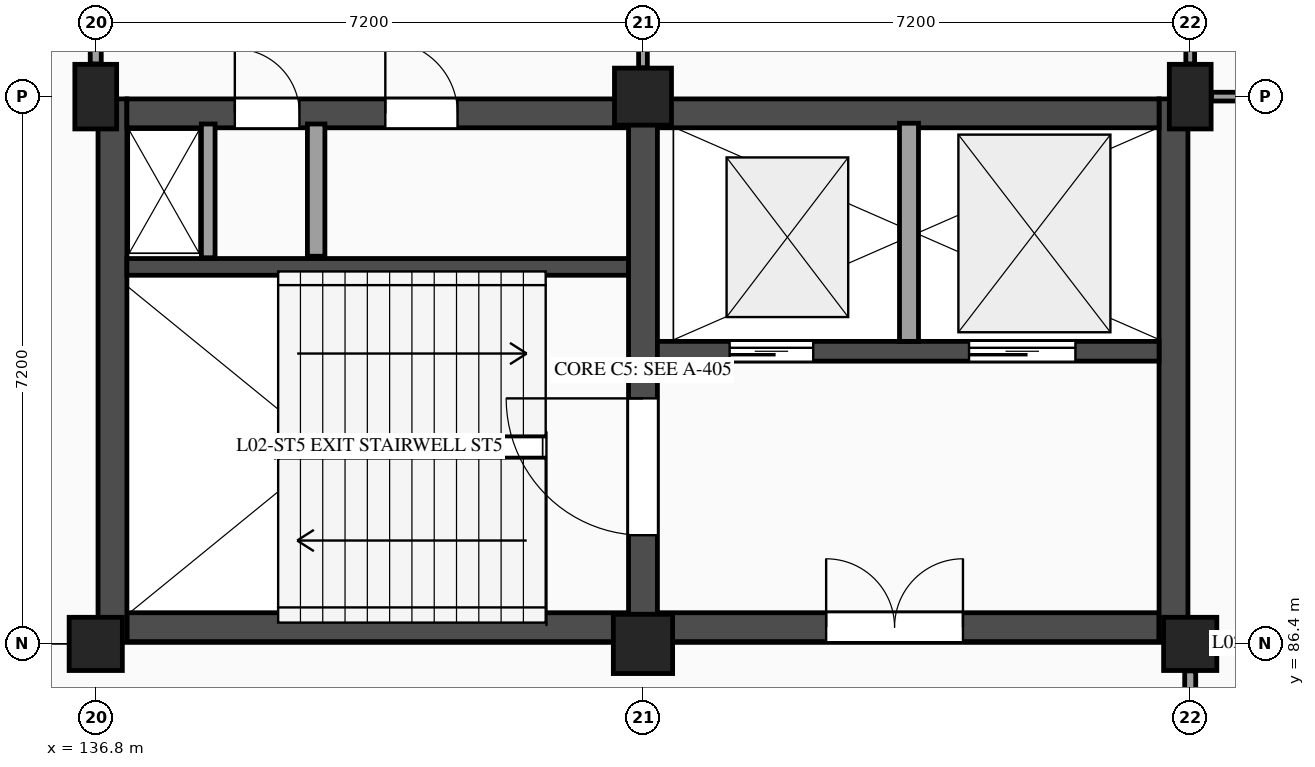
"""IFC4 building model, lengths in metres.
Left out: names, types, materials, properties, quantities, classifications, styles, units other than length and angle.
Written with IfcOpenShell. Run it as: python <this file> out.ifc"""

import sys

from ifc_helpers import new_model, si_unit, direction, frame, frame_2d, origin, origin_2d, place, context, subcontext, project, spatial, rectangle, extrude, element, fill, save


model = new_model("IFC4")
c1 = context("Model", 3, precision=1e-05, world=origin(), true_north=direction((0.0, 1.0)))
c2 = subcontext(c1, "Body", "Model", "MODEL_VIEW")
j1 = project(units=[si_unit("LENGTHUNIT", "METRE"), si_unit("PLANEANGLEUNIT", "RADIAN")], contexts=[c1])
p1 = place(None, origin())
s1 = spatial("IfcSite", under=j1, at=p1, CompositionType="ELEMENT")
p2 = place(p1, origin())
s2 = spatial("IfcBuilding", under=s1, at=p2, CompositionType="ELEMENT")
p3 = place(p2, frame((0.0, 0.0, 9.9)))
s3 = spatial("IfcBuildingStorey", under=s2, at=p3, CompositionType="ELEMENT", Elevation=9.9)
p4 = place(p3, frame((136.8, 86.4, 0.0), z_axis=(0.0, 0.0, 1.0), x_axis=(1.0, 0.0, 0.0)))
e1 = element("IfcColumn", 1, at=p4, inside=s3, PredefinedType="COLUMN", context=c2, shape_type="SweptSolid", body=[
    extrude(rectangle(XDim=0.7, YDim=0.7, at=origin_2d()), origin(), (0.0, 0.0, 1.0), 4.5),
])
p5 = place(p3, frame((136.8, 93.6, 0.0), z_axis=(0.0, 0.0, 1.0), x_axis=(1.0, 0.0, 0.0)))
e2 = element("IfcColumn", 2, at=p5, inside=s3, PredefinedType="COLUMN", context=c2, shape_type="SweptSolid", body=[
    extrude(rectangle(XDim=0.55, YDim=0.85, at=origin_2d()), origin(), (0.0, 0.0, 1.0), 4.5),
])
p6 = place(p3, frame((144.0, 86.4, 0.0), z_axis=(0.0, 0.0, 1.0), x_axis=(1.0, 0.0, 0.0)))
e3 = element("IfcColumn", 3, at=p6, inside=s3, PredefinedType="COLUMN", context=c2, shape_type="SweptSolid", body=[
    extrude(rectangle(XDim=0.78, YDim=0.78, at=origin_2d()), origin(), (0.0, 0.0, 1.0), 4.5),
])
p7 = place(p3, frame((144.0, 93.6, 0.0), z_axis=(0.0, 0.0, 1.0), x_axis=(1.0, 0.0, 0.0)))
e4 = element("IfcColumn", 4, at=p7, inside=s3, PredefinedType="COLUMN", context=c2, shape_type="SweptSolid", body=[
    extrude(rectangle(XDim=0.75, YDim=0.75, at=origin_2d()), origin(), (0.0, 0.0, 1.0), 4.5),
])
p8 = place(p3, frame((151.2, 86.4, 0.0), z_axis=(0.0, 0.0, 1.0), x_axis=(1.0, 0.0, 0.0)))
e5 = element("IfcColumn", 5, at=p8, inside=s3, PredefinedType="COLUMN", context=c2, shape_type="SweptSolid", body=[
    extrude(rectangle(XDim=0.7, YDim=0.7, at=origin_2d()), origin(), (0.0, 0.0, 1.0), 4.5),
])
p9 = place(p3, frame((151.2, 93.6, 0.0), z_axis=(0.0, 0.0, 1.0), x_axis=(1.0, 0.0, 0.0)))
e6 = element("IfcColumn", 6, at=p9, inside=s3, PredefinedType="COLUMN", context=c2, shape_type="SweptSolid", body=[
    extrude(rectangle(XDim=0.55, YDim=0.85, at=origin_2d()), origin(), (0.0, 0.0, 1.0), 4.5),
])
p10 = place(p3, frame((137.21, 86.62, 0.0), z_axis=(0.0, 0.0, 1.0), x_axis=(1.0, 0.0, 0.0)))
e7 = element("IfcWall", 7, at=p10, inside=s3, PredefinedType="SHEAR", context=c2, shape_type="SweptSolid", body=[
    extrude(rectangle(XDim=6.6, YDim=0.38, at=frame_2d((3.3, 0.0))), origin(), (0.0, 0.0, 1.0), 4.225),
])
p11 = place(p3, frame((137.02, 93.57, 0.0), z_axis=(0.0, 0.0, 1.0), x_axis=(0.0, -1.0, 0.0)))
e8 = element("IfcWall", 8, at=p11, inside=s3, PredefinedType="SHEAR", context=c2, shape_type="SweptSolid", body=[
    extrude(rectangle(XDim=7.14, YDim=0.38, at=frame_2d((3.57, 0.0))), origin(), (0.0, 0.0, 1.0), 4.225),
])
p12 = place(p3, frame((137.21, 93.38, 0.0), z_axis=(0.0, 0.0, 1.0), x_axis=(1.0, 0.0, 0.0)))
e9 = element("IfcWall", 9, at=p12, inside=s3, PredefinedType="SHEAR", context=c2, shape_type="SweptSolid", body=[
    extrude(rectangle(XDim=6.6, YDim=0.38, at=frame_2d((3.3, 0.0))), origin(), (0.0, 0.0, 1.0), 4.225),
])
p13 = place(p12, frame((1.42, 0.0, 0.0)))
e10 = element("IfcOpeningElement", 10, at=p13, cuts=e9, PredefinedType="OPENING", context=c2, shape_type="SweptSolid", body=[
    extrude(rectangle(XDim=0.85, YDim=2.1, at=frame_2d((0.425, 1.05))), frame((0.0, 0.2, 0.0), z_axis=(0.0, -1.0, 0.0), x_axis=(1.0, 0.0, 0.0)), (0.0, 0.0, 1.0), 0.4),
])
p14 = place(p12, frame((3.4, 0.0, 0.0)))
e11 = element("IfcOpeningElement", 11, at=p14, cuts=e9, PredefinedType="OPENING", context=c2, shape_type="SweptSolid", body=[
    extrude(rectangle(XDim=0.95, YDim=2.15, at=frame_2d((0.475, 1.075))), frame((0.0, 0.2, 0.0), z_axis=(0.0, -1.0, 0.0), x_axis=(1.0, 0.0, 0.0)), (0.0, 0.0, 1.0), 0.4),
])
p15 = place(p3, frame((137.21, 91.36, 0.0), z_axis=(0.0, 0.0, 1.0), x_axis=(1.0, 0.0, 0.0)))
e12 = element("IfcWall", 12, at=p15, inside=s3, PredefinedType="SHEAR", context=c2, shape_type="SweptSolid", body=[
    extrude(rectangle(XDim=6.6, YDim=0.22, at=frame_2d((3.3, 0.0))), origin(), (0.0, 0.0, 1.0), 4.225),
])
p16 = place(p3, frame((139.7, 91.5, 0.0), z_axis=(0.0, 0.0, 1.0), x_axis=(0.0, 1.0, 0.0)))
e13 = element("IfcWall", 13, at=p16, inside=s3, PredefinedType="PARTITIONING", context=c2, shape_type="SweptSolid", body=[
    extrude(rectangle(XDim=1.74, YDim=0.23, at=frame_2d((0.87, 0.0))), origin(), (0.0, 0.0, 1.0), 4.225),
])
p17 = place(p3, frame((138.28, 91.48, 0.0), z_axis=(0.0, 0.0, 1.0), x_axis=(0.0, 1.0, 0.0)))
e14 = element("IfcWall", 14, at=p17, inside=s3, PredefinedType="PARTITIONING", context=c2, shape_type="SweptSolid", body=[
    extrude(rectangle(XDim=1.76, YDim=0.18, at=frame_2d((0.88, 0.0))), origin(), (0.0, 0.0, 1.0), 4.225),
])
p18 = place(p3, frame((144.0, 86.43, 0.0), z_axis=(0.0, 0.0, 1.0), x_axis=(0.0, 1.0, 0.0)))
e15 = element("IfcWall", 15, at=p18, inside=s3, PredefinedType="SHEAR", context=c2, shape_type="SweptSolid", body=[
    extrude(rectangle(XDim=7.14, YDim=0.38, at=frame_2d((3.57, 0.0))), origin(), (0.0, 0.0, 1.0), 4.225),
])
p19 = place(p18, frame((1.4, 0.0, 0.0)))
e16 = element("IfcOpeningElement", 16, at=p19, cuts=e15, PredefinedType="OPENING", context=c2, shape_type="SweptSolid", body=[
    extrude(rectangle(XDim=1.8, YDim=2.2, at=frame_2d((0.9, 1.1))), frame((0.0, 0.2, 0.0), z_axis=(0.0, -1.0, 0.0), x_axis=(1.0, 0.0, 0.0)), (0.0, 0.0, 1.0), 0.4),
])
p20 = place(p3, frame((144.19, 86.62, 0.0), z_axis=(0.0, 0.0, 1.0), x_axis=(1.0, 0.0, 0.0)))
e17 = element("IfcWall", 17, at=p20, inside=s3, PredefinedType="SHEAR", context=c2, shape_type="SweptSolid", body=[
    extrude(rectangle(XDim=6.6, YDim=0.38, at=frame_2d((3.3, 0.0))), origin(), (0.0, 0.0, 1.0), 4.225),
])
p21 = place(p20, frame((2.22, 0.0, 0.0)))
e18 = element("IfcOpeningElement", 18, at=p21, cuts=e17, PredefinedType="OPENING", context=c2, shape_type="SweptSolid", body=[
    extrude(rectangle(XDim=1.8, YDim=2.2, at=frame_2d((0.9, 1.1))), frame((0.0, 0.2, 0.0), z_axis=(0.0, -1.0, 0.0), x_axis=(1.0, 0.0, 0.0)), (0.0, 0.0, 1.0), 0.4),
])
p22 = place(p3, frame((150.98, 86.43, 0.0), z_axis=(0.0, 0.0, 1.0), x_axis=(0.0, 1.0, 0.0)))
e19 = element("IfcWall", 19, at=p22, inside=s3, PredefinedType="SHEAR", context=c2, shape_type="SweptSolid", body=[
    extrude(rectangle(XDim=7.14, YDim=0.38, at=frame_2d((3.57, 0.0))), origin(), (0.0, 0.0, 1.0), 4.225),
])
p23 = place(p3, frame((144.19, 93.38, 0.0), z_axis=(0.0, 0.0, 1.0), x_axis=(1.0, 0.0, 0.0)))
e20 = element("IfcWall", 20, at=p23, inside=s3, PredefinedType="SHEAR", context=c2, shape_type="SweptSolid", body=[
    extrude(rectangle(XDim=6.6, YDim=0.38, at=frame_2d((3.3, 0.0))), origin(), (0.0, 0.0, 1.0), 4.225),
])
p24 = place(p3, frame((144.19, 90.25, 0.0), z_axis=(0.0, 0.0, 1.0), x_axis=(1.0, 0.0, 0.0)))
e21 = element("IfcWall", 21, at=p24, inside=s3, PredefinedType="SHEAR", context=c2, shape_type="SweptSolid", body=[
    extrude(rectangle(XDim=6.6, YDim=0.26, at=frame_2d((3.3, 0.0))), origin(), (0.0, 0.0, 1.0), 4.225),
])
p25 = place(p24, frame((0.95, 0.0, 0.0)))
e22 = element("IfcOpeningElement", 22, at=p25, cuts=e21, PredefinedType="OPENING", context=c2, shape_type="SweptSolid", body=[
    extrude(rectangle(XDim=1.1, YDim=2.2, at=frame_2d((0.55, 1.1))), frame((0.0, 0.14, 0.0), z_axis=(0.0, -1.0, 0.0), x_axis=(1.0, 0.0, 0.0)), (0.0, 0.0, 1.0), 0.28),
])
p26 = place(p24, frame((4.1, 0.0, 0.0)))
e23 = element("IfcOpeningElement", 23, at=p26, cuts=e21, PredefinedType="OPENING", context=c2, shape_type="SweptSolid", body=[
    extrude(rectangle(XDim=1.4, YDim=2.3, at=frame_2d((0.7, 1.15))), frame((0.0, 0.14, 0.0), z_axis=(0.0, -1.0, 0.0), x_axis=(1.0, 0.0, 0.0)), (0.0, 0.0, 1.0), 0.28),
])
p27 = place(p3, frame((147.5, 90.38, 0.0), z_axis=(0.0, 0.0, 1.0), x_axis=(0.0, 1.0, 0.0)))
e24 = element("IfcWall", 24, at=p27, inside=s3, PredefinedType="PARTITIONING", context=c2, shape_type="SweptSolid", body=[
    extrude(rectangle(XDim=2.87, YDim=0.25, at=frame_2d((1.435, 0.0))), origin(), (0.0, 0.0, 1.0), 4.225),
])
p28 = place(p3, frame((136.8, 94.03, 0.0), z_axis=(0.0, 0.0, 1.0), x_axis=(0.0, 1.0, 0.0)))
e25 = element("IfcWall", 25, at=p28, inside=s3, PredefinedType="PARTITIONING", context=c2, shape_type="SweptSolid", body=[
    extrude(rectangle(XDim=6.465, YDim=0.145, at=frame_2d((3.232, 0.0))), origin(), (0.0, 0.0, 1.0), 3.54),
])
p29 = place(p28, frame((2.758, 0.0, 0.0)))
e26 = element("IfcOpeningElement", 26, at=p29, cuts=e25, PredefinedType="OPENING", context=c2, shape_type="SweptSolid", body=[
    extrude(rectangle(XDim=0.95, YDim=2.15, at=frame_2d((0.475, 1.075))), frame((0.0, 0.083, 0.0), z_axis=(0.0, -1.0, 0.0), x_axis=(1.0, 0.0, 0.0)), (0.0, 0.0, 1.0), 0.165),
])
p30 = place(p3, frame((144.0, 93.98, 0.0), z_axis=(0.0, 0.0, 1.0), x_axis=(0.0, 1.0, 0.0)))
e27 = element("IfcWall", 27, at=p30, inside=s3, PredefinedType="PARTITIONING", context=c2, shape_type="SweptSolid", body=[
    extrude(rectangle(XDim=6.455, YDim=0.115, at=frame_2d((3.228, 0.0))), origin(), (0.0, 0.0, 1.0), 3.54),
])
p31 = place(p30, frame((2.538, 0.0, 0.0)))
e28 = element("IfcOpeningElement", 28, at=p31, cuts=e27, PredefinedType="OPENING", context=c2, shape_type="SweptSolid", body=[
    extrude(rectangle(XDim=1.38, YDim=2.22, at=frame_2d((0.69, 1.11))), frame((0.0, 0.067, 0.0), z_axis=(0.0, -1.0, 0.0), x_axis=(1.0, 0.0, 0.0)), (0.0, 0.0, 1.0), 0.135),
])
p32 = place(p3, frame((151.2, 79.565, 0.0), z_axis=(0.0, 0.0, 1.0), x_axis=(0.0, 1.0, 0.0)))
e29 = element("IfcWall", 29, at=p32, inside=s3, PredefinedType="PARTITIONING", context=c2, shape_type="SweptSolid", body=[
    extrude(rectangle(XDim=6.48, YDim=0.145, at=frame_2d((3.24, 0.0))), origin(), (0.0, 0.0, 1.0), 3.595),
])
p33 = place(p32, frame((2.6, 0.0, 0.0)))
e30 = element("IfcOpeningElement", 30, at=p33, cuts=e29, PredefinedType="OPENING", context=c2, shape_type="SweptSolid", body=[
    extrude(rectangle(XDim=1.28, YDim=2.24, at=frame_2d((0.64, 1.12))), frame((0.0, 0.083, 0.0), z_axis=(0.0, -1.0, 0.0), x_axis=(1.0, 0.0, 0.0)), (0.0, 0.0, 1.0), 0.165),
])
p34 = place(p3, frame((151.2, 94.03, 0.0), z_axis=(0.0, 0.0, 1.0), x_axis=(0.0, 1.0, 0.0)))
e31 = element("IfcWall", 31, at=p34, inside=s3, PredefinedType="PARTITIONING", context=c2, shape_type="SweptSolid", body=[
    extrude(rectangle(XDim=6.465, YDim=0.115, at=frame_2d((3.232, 0.0))), origin(), (0.0, 0.0, 1.0), 3.54),
])
p35 = place(p34, frame((2.683, 0.0, 0.0)))
e32 = element("IfcOpeningElement", 32, at=p35, cuts=e31, PredefinedType="OPENING", context=c2, shape_type="SweptSolid", body=[
    extrude(rectangle(XDim=1.1, YDim=2.15, at=frame_2d((0.55, 1.075))), frame((0.0, 0.067, 0.0), z_axis=(0.0, -1.0, 0.0), x_axis=(1.0, 0.0, 0.0)), (0.0, 0.0, 1.0), 0.135),
])
p36 = place(p3, frame((151.48, 93.6, 0.0), z_axis=(0.0, 0.0, 1.0), x_axis=(1.0, 0.0, 0.0)))
e33 = element("IfcWall", 33, at=p36, inside=s3, PredefinedType="PARTITIONING", context=c2, shape_type="SweptSolid", body=[
    extrude(rectangle(XDim=6.54, YDim=0.115, at=frame_2d((3.27, 0.0))), origin(), (0.0, 0.0, 1.0), 3.5),
])
p37 = place(p13, origin())
e34 = element("IfcDoor", 34, at=p37, inside=s3, OperationType="SINGLE_SWING_LEFT", PredefinedType="DOOR", context=c2, shape_type="SweptSolid", body=[
    extrude(rectangle(XDim=0.85, YDim=2.1, at=frame_2d((0.425, 1.05))), frame((0.0, 0.025, 0.0), z_axis=(0.0, -1.0, 0.0), x_axis=(1.0, 0.0, 0.0)), (0.0, 0.0, 1.0), 0.05),
])
fill(e10, e34)
p38 = place(p19, origin())
e35 = element("IfcDoor", 35, at=p38, inside=s3, OperationType="SINGLE_SWING_RIGHT", PredefinedType="DOOR", context=c2, shape_type="SweptSolid", body=[
    extrude(rectangle(XDim=1.8, YDim=2.2, at=frame_2d((0.9, 1.1))), frame((0.0, 0.025, 0.0), z_axis=(0.0, -1.0, 0.0), x_axis=(1.0, 0.0, 0.0)), (0.0, 0.0, 1.0), 0.05),
])
fill(e16, e35)
p39 = place(p14, origin())
e36 = element("IfcDoor", 36, at=p39, inside=s3, OperationType="SINGLE_SWING_LEFT", PredefinedType="DOOR", context=c2, shape_type="SweptSolid", body=[
    extrude(rectangle(XDim=0.95, YDim=2.15, at=frame_2d((0.475, 1.075))), frame((0.0, 0.025, 0.0), z_axis=(0.0, -1.0, 0.0), x_axis=(1.0, 0.0, 0.0)), (0.0, 0.0, 1.0), 0.05),
])
fill(e11, e36)
p40 = place(p25, origin())
e37 = element("IfcDoor", 37, at=p40, inside=s3, OperationType="SLIDING_TO_LEFT", PredefinedType="DOOR", context=c2, shape_type="SweptSolid", body=[
    extrude(rectangle(XDim=1.1, YDim=2.2, at=frame_2d((0.55, 1.1))), frame((0.0, 0.025, 0.0), z_axis=(0.0, -1.0, 0.0), x_axis=(1.0, 0.0, 0.0)), (0.0, 0.0, 1.0), 0.05),
])
fill(e22, e37)
p41 = place(p26, origin())
e38 = element("IfcDoor", 38, at=p41, inside=s3, OperationType="SLIDING_TO_RIGHT", PredefinedType="DOOR", context=c2, shape_type="SweptSolid", body=[
    extrude(rectangle(XDim=1.4, YDim=2.3, at=frame_2d((0.7, 1.15))), frame((0.0, 0.025, 0.0), z_axis=(0.0, -1.0, 0.0), x_axis=(1.0, 0.0, 0.0)), (0.0, 0.0, 1.0), 0.05),
])
fill(e23, e38)
p42 = place(p21, origin())
e39 = element("IfcDoor", 39, at=p42, inside=s3, OperationType="DOUBLE_DOOR_SINGLE_SWING", PredefinedType="DOOR", context=c2, shape_type="SweptSolid", body=[
    extrude(rectangle(XDim=1.8, YDim=2.2, at=frame_2d((0.9, 1.1))), frame((0.0, 0.025, 0.0), z_axis=(0.0, -1.0, 0.0), x_axis=(1.0, 0.0, 0.0)), (0.0, 0.0, 1.0), 0.05),
])
fill(e18, e39)
save(model, sys.argv[1])
